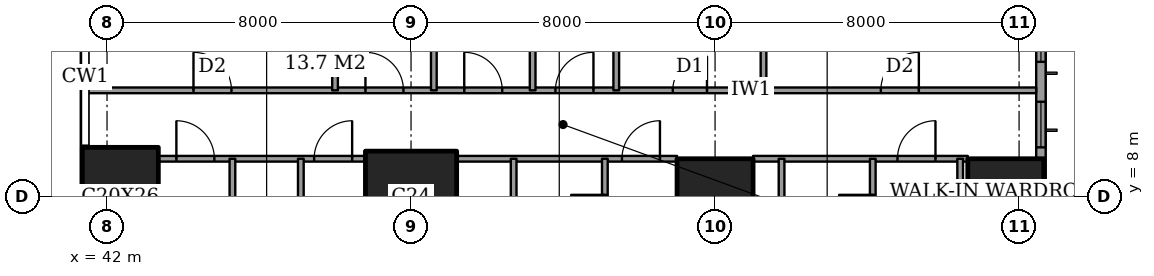
"""IFC4 building model, lengths in metres.
Left out: names, types, materials, properties, quantities, classifications, styles, units other than length and angle.
Written with IfcOpenShell. Run it as: python <this file> out.ifc"""

import sys

from ifc_helpers import new_model, si_unit, direction, frame, frame_2d, origin, origin_2d, place, context, subcontext, project, spatial, rectangle, extrude, element, fill, save


model = new_model("IFC4")
c1 = context("Model", 3, precision=1e-05, world=origin(), true_north=direction((0.0, 1.0)))
c2 = subcontext(c1, "Body", "Model", "MODEL_VIEW")
j1 = project(units=[si_unit("LENGTHUNIT", "METRE"), si_unit("PLANEANGLEUNIT", "RADIAN")], contexts=[c1])
p1 = place(None, origin())
s1 = spatial("IfcSite", under=j1, at=p1, CompositionType="ELEMENT")
p2 = place(p1, origin())
s2 = spatial("IfcBuilding", under=s1, at=p2, CompositionType="ELEMENT")
p3 = place(p2, frame((0.0, 0.0, 128.6)))
s3 = spatial("IfcBuildingStorey", under=s2, at=p3, CompositionType="ELEMENT", Elevation=128.6)
p4 = place(p3, frame((42.35, 8.0, 0.0), z_axis=(0.0, 0.0, 1.0), x_axis=(1.0, 0.0, 0.0)))
e1 = element("IfcColumn", 1, at=p4, inside=s3, PredefinedType="COLUMN", context=c2, shape_type="SweptSolid", body=[
    extrude(rectangle(XDim=2.0, YDim=2.6, at=origin_2d()), origin(), (0.0, 0.0, 1.0), 3.6),
])
p5 = place(p3, frame((50.0, 8.0, 0.0), z_axis=(0.0, 0.0, 1.0), x_axis=(1.0, 0.0, 0.0)))
e2 = element("IfcColumn", 2, at=p5, inside=s3, PredefinedType="COLUMN", context=c2, shape_type="SweptSolid", body=[
    extrude(rectangle(XDim=2.4, YDim=2.4, at=origin_2d()), origin(), (0.0, 0.0, 1.0), 3.6),
])
for number, where, z_axis, x_axis in (
    (3, (58.0, 8.0, 0.0), (0.0, 0.0, 1.0), (1.0, 0.0, 0.0)),
    (4, (65.65, 8.0, 0.0), (0.0, 0.0, 1.0), (1.0, 0.0, 0.0)),
):
    element("IfcColumn", number, at=place(p3, frame(where, z_axis=z_axis, x_axis=x_axis)), inside=s3, PredefinedType="COLUMN", context=c2, shape_type="SweptSolid", body=[
        extrude(rectangle(XDim=2.0, YDim=2.0, at=origin_2d()), origin(), (0.0, 0.0, 1.0), 3.6),
    ])
p6 = place(p3, frame((66.575, 3.175, 0.0), z_axis=(0.0, 0.0, 1.0), x_axis=(0.0, 1.0, 0.0)))
e5 = element("IfcWall", 5, at=p6, inside=s3, PredefinedType="SOLIDWALL", context=c2, shape_type="SweptSolid", body=[
    extrude(rectangle(XDim=41.65, YDim=0.25, at=frame_2d((20.825, 0.0))), origin(), (0.0, 0.0, 1.0), 3.6),
])
p7 = place(p6, frame((0.775, 0.0, 0.4)))
e6 = element("IfcOpeningElement", 6, at=p7, cuts=e5, PredefinedType="OPENING", context=c2, shape_type="SweptSolid", body=[
    extrude(rectangle(XDim=2.4, YDim=2.2, at=frame_2d((1.2, 1.1))), frame((0.0, 0.135, 0.0), z_axis=(0.0, -1.0, 0.0), x_axis=(1.0, 0.0, 0.0)), (0.0, 0.0, 1.0), 0.27),
])
p8 = place(p6, frame((6.125, 0.0, 0.4)))
e7 = element("IfcOpeningElement", 7, at=p8, cuts=e5, PredefinedType="OPENING", context=c2, shape_type="SweptSolid", body=[
    extrude(rectangle(XDim=1.2, YDim=2.2, at=frame_2d((0.6, 1.1))), frame((0.0, 0.135, 0.0), z_axis=(0.0, -1.0, 0.0), x_axis=(1.0, 0.0, 0.0)), (0.0, 0.0, 1.0), 0.27),
])
p9 = place(p6, frame((8.375, 0.0, 0.4)))
e8 = element("IfcOpeningElement", 8, at=p9, cuts=e5, PredefinedType="OPENING", context=c2, shape_type="SweptSolid", body=[
    extrude(rectangle(XDim=2.4, YDim=2.2, at=frame_2d((1.2, 1.1))), frame((0.0, 0.135, 0.0), z_axis=(0.0, -1.0, 0.0), x_axis=(1.0, 0.0, 0.0)), (0.0, 0.0, 1.0), 0.27),
])
p10 = place(p6, frame((15.775, 0.0, 0.4)))
e9 = element("IfcOpeningElement", 9, at=p10, cuts=e5, PredefinedType="OPENING", context=c2, shape_type="SweptSolid", body=[
    extrude(rectangle(XDim=2.4, YDim=2.2, at=frame_2d((1.2, 1.1))), frame((0.0, 0.135, 0.0), z_axis=(0.0, -1.0, 0.0), x_axis=(1.0, 0.0, 0.0)), (0.0, 0.0, 1.0), 0.27),
])
p11 = place(p6, frame((23.475, 0.0, 0.4)))
e10 = element("IfcOpeningElement", 10, at=p11, cuts=e5, PredefinedType="OPENING", context=c2, shape_type="SweptSolid", body=[
    extrude(rectangle(XDim=2.4, YDim=2.2, at=frame_2d((1.2, 1.1))), frame((0.0, 0.135, 0.0), z_axis=(0.0, -1.0, 0.0), x_axis=(1.0, 0.0, 0.0)), (0.0, 0.0, 1.0), 0.27),
])
p12 = place(p6, frame((30.975, 0.0, 0.4)))
e11 = element("IfcOpeningElement", 11, at=p12, cuts=e5, PredefinedType="OPENING", context=c2, shape_type="SweptSolid", body=[
    extrude(rectangle(XDim=2.4, YDim=2.2, at=frame_2d((1.2, 1.1))), frame((0.0, 0.135, 0.0), z_axis=(0.0, -1.0, 0.0), x_axis=(1.0, 0.0, 0.0)), (0.0, 0.0, 1.0), 0.27),
])
p13 = place(p6, frame((34.5, 0.0, 0.4)))
e12 = element("IfcOpeningElement", 12, at=p13, cuts=e5, PredefinedType="OPENING", context=c2, shape_type="SweptSolid", body=[
    extrude(rectangle(XDim=1.2, YDim=2.2, at=frame_2d((0.6, 1.1))), frame((0.0, 0.135, 0.0), z_axis=(0.0, -1.0, 0.0), x_axis=(1.0, 0.0, 0.0)), (0.0, 0.0, 1.0), 0.27),
])
p14 = place(p6, frame((38.475, 0.0, 0.4)))
e13 = element("IfcOpeningElement", 13, at=p14, cuts=e5, PredefinedType="OPENING", context=c2, shape_type="SweptSolid", body=[
    extrude(rectangle(XDim=2.4, YDim=2.2, at=frame_2d((1.2, 1.1))), frame((0.0, 0.135, 0.0), z_axis=(0.0, -1.0, 0.0), x_axis=(1.0, 0.0, 0.0)), (0.0, 0.0, 1.0), 0.27),
])
p15 = place(p3, frame((43.35, 9.0, 0.0), z_axis=(0.0, 0.0, 1.0), x_axis=(1.0, 0.0, 0.0)))
e14 = element("IfcWall", 14, at=p15, inside=s3, PredefinedType="PARTITIONING", context=c2, shape_type="SweptSolid", body=[
    extrude(rectangle(XDim=5.45, YDim=0.15, at=frame_2d((2.725, 0.0))), origin(), (0.0, 0.0, 1.0), 3.35),
])
p16 = place(p15, frame((4.1, 0.0, 0.0)))
e15 = element("IfcOpeningElement", 15, at=p16, cuts=e14, PredefinedType="OPENING", context=c2, shape_type="SweptSolid", body=[
    extrude(rectangle(XDim=1.0, YDim=2.1, at=frame_2d((0.5, 1.05))), frame((0.0, 0.085, 0.0), z_axis=(0.0, -1.0, 0.0), x_axis=(1.0, 0.0, 0.0)), (0.0, 0.0, 1.0), 0.17),
])
p17 = place(p15, frame((0.475, 0.0, 0.0)))
e16 = element("IfcOpeningElement", 16, at=p17, cuts=e14, PredefinedType="OPENING", context=c2, shape_type="SweptSolid", body=[
    extrude(rectangle(XDim=1.0, YDim=2.1, at=frame_2d((0.5, 1.05))), frame((0.0, 0.085, 0.0), z_axis=(0.0, -1.0, 0.0), x_axis=(1.0, 0.0, 0.0)), (0.0, 0.0, 1.0), 0.17),
])
p18 = place(p3, frame((51.2, 9.0, 0.0), z_axis=(0.0, 0.0, 1.0), x_axis=(1.0, 0.0, 0.0)))
e17 = element("IfcWall", 17, at=p18, inside=s3, PredefinedType="PARTITIONING", context=c2, shape_type="SweptSolid", body=[
    extrude(rectangle(XDim=5.8, YDim=0.15, at=frame_2d((2.9, 0.0))), origin(), (0.0, 0.0, 1.0), 3.35),
])
p19 = place(p18, frame((4.35, 0.0, 0.0)))
e18 = element("IfcOpeningElement", 18, at=p19, cuts=e17, PredefinedType="OPENING", context=c2, shape_type="SweptSolid", body=[
    extrude(rectangle(XDim=1.0, YDim=2.1, at=frame_2d((0.5, 1.05))), frame((0.0, 0.085, 0.0), z_axis=(0.0, -1.0, 0.0), x_axis=(1.0, 0.0, 0.0)), (0.0, 0.0, 1.0), 0.17),
])
p20 = place(p3, frame((59.0, 9.0, 0.0), z_axis=(0.0, 0.0, 1.0), x_axis=(1.0, 0.0, 0.0)))
e19 = element("IfcWall", 19, at=p20, inside=s3, PredefinedType="PARTITIONING", context=c2, shape_type="SweptSolid", body=[
    extrude(rectangle(XDim=5.65, YDim=0.15, at=frame_2d((2.825, 0.0))), origin(), (0.0, 0.0, 1.0), 3.35),
])
p21 = place(p20, frame((3.8, 0.0, 0.0)))
e20 = element("IfcOpeningElement", 20, at=p21, cuts=e19, PredefinedType="OPENING", context=c2, shape_type="SweptSolid", body=[
    extrude(rectangle(XDim=1.0, YDim=2.1, at=frame_2d((0.5, 1.05))), frame((0.0, 0.085, 0.0), z_axis=(0.0, -1.0, 0.0), x_axis=(1.0, 0.0, 0.0)), (0.0, 0.0, 1.0), 0.17),
])
p22 = place(p3, frame((41.439, 10.8, 0.0), z_axis=(0.0, 0.0, 1.0), x_axis=(1.0, 0.0, 0.0)))
e21 = element("IfcWall", 21, at=p22, inside=s3, PredefinedType="PARTITIONING", context=c2, shape_type="SweptSolid", body=[
    extrude(rectangle(XDim=25.011, YDim=0.15, at=frame_2d((12.505, 0.0))), origin(), (0.0, 0.0, 1.0), 3.35),
])
p23 = place(p22, frame((12.361, 0.0, 0.0)))
e22 = element("IfcOpeningElement", 22, at=p23, cuts=e21, PredefinedType="OPENING", context=c2, shape_type="SweptSolid", body=[
    extrude(rectangle(XDim=1.0, YDim=2.1, at=frame_2d((0.5, 1.05))), frame((0.0, 0.085, 0.0), z_axis=(0.0, -1.0, 0.0), x_axis=(1.0, 0.0, 0.0)), (0.0, 0.0, 1.0), 0.17),
])
p24 = place(p22, frame((20.924, 0.0, 0.0)))
e23 = element("IfcOpeningElement", 23, at=p24, cuts=e21, PredefinedType="OPENING", context=c2, shape_type="SweptSolid", body=[
    extrude(rectangle(XDim=1.0, YDim=2.1, at=frame_2d((0.5, 1.05))), frame((0.0, 0.085, 0.0), z_axis=(0.0, -1.0, 0.0), x_axis=(1.0, 0.0, 0.0)), (0.0, 0.0, 1.0), 0.17),
])
p25 = place(p22, frame((15.448, 0.0, 0.0)))
e24 = element("IfcOpeningElement", 24, at=p25, cuts=e21, PredefinedType="OPENING", context=c2, shape_type="SweptSolid", body=[
    extrude(rectangle(XDim=0.9, YDim=2.1, at=frame_2d((0.45, 1.05))), frame((0.0, 0.085, 0.0), z_axis=(0.0, -1.0, 0.0), x_axis=(1.0, 0.0, 0.0)), (0.0, 0.0, 1.0), 0.17),
])
p26 = place(p22, frame((9.961, 0.0, 0.0)))
e25 = element("IfcOpeningElement", 25, at=p26, cuts=e21, PredefinedType="OPENING", context=c2, shape_type="SweptSolid", body=[
    extrude(rectangle(XDim=1.0, YDim=2.1, at=frame_2d((0.5, 1.05))), frame((0.0, 0.085, 0.0), z_axis=(0.0, -1.0, 0.0), x_axis=(1.0, 0.0, 0.0)), (0.0, 0.0, 1.0), 0.17),
])
p27 = place(p22, frame((7.361, 0.0, 0.0)))
e26 = element("IfcOpeningElement", 26, at=p27, cuts=e21, PredefinedType="OPENING", context=c2, shape_type="SweptSolid", body=[
    extrude(rectangle(XDim=1.0, YDim=2.1, at=frame_2d((0.5, 1.05))), frame((0.0, 0.085, 0.0), z_axis=(0.0, -1.0, 0.0), x_axis=(1.0, 0.0, 0.0)), (0.0, 0.0, 1.0), 0.17),
])
p28 = place(p22, frame((2.836, 0.0, 0.0)))
e27 = element("IfcOpeningElement", 27, at=p28, cuts=e21, PredefinedType="OPENING", context=c2, shape_type="SweptSolid", body=[
    extrude(rectangle(XDim=1.0, YDim=2.1, at=frame_2d((0.5, 1.05))), frame((0.0, 0.085, 0.0), z_axis=(0.0, -1.0, 0.0), x_axis=(1.0, 0.0, 0.0)), (0.0, 0.0, 1.0), 0.17),
])
p29 = place(p3, frame((45.3, -0.45, 0.0), z_axis=(0.0, 0.0, 1.0), x_axis=(0.0, 1.0, 0.0)))
e28 = element("IfcWall", 28, at=p29, inside=s3, PredefinedType="PARTITIONING", context=c2, shape_type="SweptSolid", body=[
    extrude(rectangle(XDim=9.45, YDim=0.15, at=frame_2d((4.725, 0.0))), origin(), (0.0, 0.0, 1.0), 3.35),
])
p30 = place(p3, frame((47.1, 5.2, 0.0), z_axis=(0.0, 0.0, 1.0), x_axis=(0.0, 1.0, 0.0)))
e29 = element("IfcWall", 29, at=p30, inside=s3, PredefinedType="PARTITIONING", context=c2, shape_type="SweptSolid", body=[
    extrude(rectangle(XDim=3.8, YDim=0.15, at=frame_2d((1.9, 0.0))), origin(), (0.0, 0.0, 1.0), 3.35),
])
p31 = place(p30, frame((1.45, 0.0, 0.0)))
e30 = element("IfcOpeningElement", 30, at=p31, cuts=e29, PredefinedType="OPENING", context=c2, shape_type="SweptSolid", body=[
    extrude(rectangle(XDim=0.9, YDim=2.1, at=frame_2d((0.45, 1.05))), frame((0.0, 0.085, 0.0), z_axis=(0.0, -1.0, 0.0), x_axis=(1.0, 0.0, 0.0)), (0.0, 0.0, 1.0), 0.17),
])
p32 = place(p3, frame((48.0, 10.8, 0.0), z_axis=(0.0, 0.0, 1.0), x_axis=(0.0, 1.0, 0.0)))
e31 = element("IfcWall", 31, at=p32, inside=s3, PredefinedType="PARTITIONING", context=c2, shape_type="SweptSolid", body=[
    extrude(rectangle(XDim=6.7, YDim=0.15, at=frame_2d((3.35, 0.0))), origin(), (0.0, 0.0, 1.0), 3.35),
])
p33 = place(p3, frame((50.6, 10.8, 0.0), z_axis=(0.0, 0.0, 1.0), x_axis=(0.0, 1.0, 0.0)))
e32 = element("IfcWall", 32, at=p33, inside=s3, PredefinedType="PARTITIONING", context=c2, shape_type="SweptSolid", body=[
    extrude(rectangle(XDim=4.0, YDim=0.15, at=frame_2d((2.0, 0.0))), origin(), (0.0, 0.0, 1.0), 3.35),
])
p34 = place(p3, frame((52.7, -0.45, 0.0), z_axis=(0.0, 0.0, 1.0), x_axis=(0.0, 1.0, 0.0)))
e33 = element("IfcWall", 33, at=p34, inside=s3, PredefinedType="PARTITIONING", context=c2, shape_type="SweptSolid", body=[
    extrude(rectangle(XDim=9.45, YDim=0.15, at=frame_2d((4.725, 0.0))), origin(), (0.0, 0.0, 1.0), 3.35),
])
p35 = place(p34, frame((2.875, 0.0, 0.0)))
e34 = element("IfcOpeningElement", 34, at=p35, cuts=e33, PredefinedType="OPENING", context=c2, shape_type="SweptSolid", body=[
    extrude(rectangle(XDim=0.9, YDim=2.1, at=frame_2d((0.45, 1.05))), frame((0.0, 0.085, 0.0), z_axis=(0.0, -1.0, 0.0), x_axis=(1.0, 0.0, 0.0)), (0.0, 0.0, 1.0), 0.17),
])
p36 = place(p3, frame((53.2, 10.8, 0.0), z_axis=(0.0, 0.0, 1.0), x_axis=(0.0, 1.0, 0.0)))
e35 = element("IfcWall", 35, at=p36, inside=s3, PredefinedType="PARTITIONING", context=c2, shape_type="SweptSolid", body=[
    extrude(rectangle(XDim=6.7, YDim=0.15, at=frame_2d((3.35, 0.0))), origin(), (0.0, 0.0, 1.0), 3.35),
])
p37 = place(p3, frame((55.1, 6.2, 0.0), z_axis=(0.0, 0.0, 1.0), x_axis=(0.0, 1.0, 0.0)))
e36 = element("IfcWall", 36, at=p37, inside=s3, PredefinedType="PARTITIONING", context=c2, shape_type="SweptSolid", body=[
    extrude(rectangle(XDim=2.8, YDim=0.15, at=frame_2d((1.4, 0.0))), origin(), (0.0, 0.0, 1.0), 3.35),
])
p38 = place(p37, frame((0.95, 0.0, 0.0)))
e37 = element("IfcOpeningElement", 37, at=p38, cuts=e36, PredefinedType="OPENING", context=c2, shape_type="SweptSolid", body=[
    extrude(rectangle(XDim=0.9, YDim=2.1, at=frame_2d((0.45, 1.05))), frame((0.0, 0.085, 0.0), z_axis=(0.0, -1.0, 0.0), x_axis=(1.0, 0.0, 0.0)), (0.0, 0.0, 1.0), 0.17),
])
p39 = place(p3, frame((55.4, 10.8, 0.0), z_axis=(0.0, 0.0, 1.0), x_axis=(0.0, 1.0, 0.0)))
e38 = element("IfcWall", 38, at=p39, inside=s3, PredefinedType="PARTITIONING", context=c2, shape_type="SweptSolid", body=[
    extrude(rectangle(XDim=10.8, YDim=0.15, at=frame_2d((5.4, 0.0))), origin(), (0.0, 0.0, 1.0), 3.35),
])
p40 = place(p39, frame((8.25, 0.0, 0.0)))
e39 = element("IfcOpeningElement", 39, at=p40, cuts=e38, PredefinedType="OPENING", context=c2, shape_type="SweptSolid", body=[
    extrude(rectangle(XDim=1.0, YDim=2.1, at=frame_2d((0.5, 1.05))), frame((0.0, 0.085, 0.0), z_axis=(0.0, -1.0, 0.0), x_axis=(1.0, 0.0, 0.0)), (0.0, 0.0, 1.0), 0.17),
])
p41 = place(p3, frame((59.275, 10.8, 0.0), z_axis=(0.0, 0.0, 1.0), x_axis=(0.0, 1.0, 0.0)))
e40 = element("IfcWall", 40, at=p41, inside=s3, PredefinedType="PARTITIONING", context=c2, shape_type="SweptSolid", body=[
    extrude(rectangle(XDim=4.0, YDim=0.15, at=frame_2d((2.0, 0.0))), origin(), (0.0, 0.0, 1.0), 3.35),
])
p42 = place(p3, frame((59.75, -0.45, 0.0), z_axis=(0.0, 0.0, 1.0), x_axis=(0.0, 1.0, 0.0)))
e41 = element("IfcWall", 41, at=p42, inside=s3, PredefinedType="PARTITIONING", context=c2, shape_type="SweptSolid", body=[
    extrude(rectangle(XDim=9.45, YDim=0.15, at=frame_2d((4.725, 0.0))), origin(), (0.0, 0.0, 1.0), 3.35),
])
p43 = place(p42, frame((2.875, 0.0, 0.0)))
e42 = element("IfcOpeningElement", 42, at=p43, cuts=e41, PredefinedType="OPENING", context=c2, shape_type="SweptSolid", body=[
    extrude(rectangle(XDim=0.9, YDim=2.1, at=frame_2d((0.45, 1.05))), frame((0.0, 0.085, 0.0), z_axis=(0.0, -1.0, 0.0), x_axis=(1.0, 0.0, 0.0)), (0.0, 0.0, 1.0), 0.17),
])
p44 = place(p3, frame((62.15, 6.2, 0.0), z_axis=(0.0, 0.0, 1.0), x_axis=(0.0, 1.0, 0.0)))
e43 = element("IfcWall", 43, at=p44, inside=s3, PredefinedType="PARTITIONING", context=c2, shape_type="SweptSolid", body=[
    extrude(rectangle(XDim=2.8, YDim=0.15, at=frame_2d((1.4, 0.0))), origin(), (0.0, 0.0, 1.0), 3.35),
])
p45 = place(p44, frame((0.95, 0.0, 0.0)))
e44 = element("IfcOpeningElement", 44, at=p45, cuts=e43, PredefinedType="OPENING", context=c2, shape_type="SweptSolid", body=[
    extrude(rectangle(XDim=0.9, YDim=2.1, at=frame_2d((0.45, 1.05))), frame((0.0, 0.085, 0.0), z_axis=(0.0, -1.0, 0.0), x_axis=(1.0, 0.0, 0.0)), (0.0, 0.0, 1.0), 0.17),
])
p46 = place(p3, frame((64.45, 3.3, 0.0), z_axis=(0.0, 0.0, 1.0), x_axis=(0.0, 1.0, 0.0)))
e45 = element("IfcWall", 45, at=p46, inside=s3, PredefinedType="PARTITIONING", context=c2, shape_type="SweptSolid", body=[
    extrude(rectangle(XDim=5.7, YDim=0.15, at=frame_2d((2.85, 0.0))), origin(), (0.0, 0.0, 1.0), 3.35),
])
p47 = place(p46, frame((2.4, 0.0, 0.0)))
e46 = element("IfcOpeningElement", 46, at=p47, cuts=e45, PredefinedType="OPENING", context=c2, shape_type="SweptSolid", body=[
    extrude(rectangle(XDim=0.9, YDim=2.1, at=frame_2d((0.45, 1.05))), frame((0.0, 0.085, 0.0), z_axis=(0.0, -1.0, 0.0), x_axis=(1.0, 0.0, 0.0)), (0.0, 0.0, 1.0), 0.17),
])
p48 = place(p8, origin())
e47 = element("IfcWindow", 47, at=p48, inside=s3, PartitioningType="SINGLE_PANEL", PredefinedType="WINDOW", context=c2, shape_type="SweptSolid", body=[
    extrude(rectangle(XDim=1.2, YDim=2.2, at=frame_2d((0.6, 1.1))), frame((0.0, 0.03, 0.0), z_axis=(0.0, -1.0, 0.0), x_axis=(1.0, 0.0, 0.0)), (0.0, 0.0, 1.0), 0.06),
])
fill(e7, e47)
p49 = place(p9, origin())
e48 = element("IfcWindow", 48, at=p49, inside=s3, PartitioningType="SINGLE_PANEL", PredefinedType="WINDOW", context=c2, shape_type="SweptSolid", body=[
    extrude(rectangle(XDim=2.4, YDim=2.2, at=frame_2d((1.2, 1.1))), frame((0.0, 0.03, 0.0), z_axis=(0.0, -1.0, 0.0), x_axis=(1.0, 0.0, 0.0)), (0.0, 0.0, 1.0), 0.06),
])
fill(e8, e48)
p50 = place(p45, origin())
e49 = element("IfcDoor", 49, at=p50, inside=s3, OperationType="SINGLE_SWING_LEFT", PredefinedType="DOOR", context=c2, shape_type="SweptSolid", body=[
    extrude(rectangle(XDim=0.9, YDim=2.1, at=frame_2d((0.45, 1.05))), frame((0.0, 0.025, 0.0), z_axis=(0.0, -1.0, 0.0), x_axis=(1.0, 0.0, 0.0)), (0.0, 0.0, 1.0), 0.05),
])
fill(e44, e49)
p51 = place(p21, origin())
e50 = element("IfcDoor", 50, at=p51, inside=s3, OperationType="SINGLE_SWING_LEFT", PredefinedType="DOOR", context=c2, shape_type="SweptSolid", body=[
    extrude(rectangle(XDim=1.0, YDim=2.1, at=frame_2d((0.5, 1.05))), frame((0.0, 0.025, 0.0), z_axis=(0.0, -1.0, 0.0), x_axis=(1.0, 0.0, 0.0)), (0.0, 0.0, 1.0), 0.05),
])
fill(e20, e50)
p52 = place(p38, origin())
e51 = element("IfcDoor", 51, at=p52, inside=s3, OperationType="SINGLE_SWING_LEFT", PredefinedType="DOOR", context=c2, shape_type="SweptSolid", body=[
    extrude(rectangle(XDim=0.9, YDim=2.1, at=frame_2d((0.45, 1.05))), frame((0.0, 0.025, 0.0), z_axis=(0.0, -1.0, 0.0), x_axis=(1.0, 0.0, 0.0)), (0.0, 0.0, 1.0), 0.05),
])
fill(e37, e51)
p53 = place(p19, origin())
e52 = element("IfcDoor", 52, at=p53, inside=s3, OperationType="SINGLE_SWING_LEFT", PredefinedType="DOOR", context=c2, shape_type="SweptSolid", body=[
    extrude(rectangle(XDim=1.0, YDim=2.1, at=frame_2d((0.5, 1.05))), frame((0.0, 0.025, 0.0), z_axis=(0.0, -1.0, 0.0), x_axis=(1.0, 0.0, 0.0)), (0.0, 0.0, 1.0), 0.05),
])
fill(e18, e52)
p54 = place(p16, origin())
e53 = element("IfcDoor", 53, at=p54, inside=s3, OperationType="SINGLE_SWING_LEFT", PredefinedType="DOOR", context=c2, shape_type="SweptSolid", body=[
    extrude(rectangle(XDim=1.0, YDim=2.1, at=frame_2d((0.5, 1.05))), frame((0.0, 0.025, 0.0), z_axis=(0.0, -1.0, 0.0), x_axis=(1.0, 0.0, 0.0)), (0.0, 0.0, 1.0), 0.05),
])
fill(e15, e53)
p55 = place(p17, origin())
e54 = element("IfcDoor", 54, at=p55, inside=s3, OperationType="SINGLE_SWING_RIGHT", PredefinedType="DOOR", context=c2, shape_type="SweptSolid", body=[
    extrude(rectangle(XDim=1.0, YDim=2.1, at=frame_2d((0.5, 1.05))), frame((0.0, 0.025, 0.0), z_axis=(0.0, -1.0, 0.0), x_axis=(1.0, 0.0, 0.0)), (0.0, 0.0, 1.0), 0.05),
])
fill(e16, e54)
p56 = place(p23, origin())
e55 = element("IfcDoor", 55, at=p56, inside=s3, OperationType="SINGLE_SWING_LEFT", PredefinedType="DOOR", context=c2, shape_type="SweptSolid", body=[
    extrude(rectangle(XDim=1.0, YDim=2.1, at=frame_2d((0.5, 1.05))), frame((0.0, 0.025, 0.0), z_axis=(0.0, -1.0, 0.0), x_axis=(1.0, 0.0, 0.0)), (0.0, 0.0, 1.0), 0.05),
])
fill(e22, e55)
p57 = place(p24, origin())
e56 = element("IfcDoor", 56, at=p57, inside=s3, OperationType="SINGLE_SWING_LEFT", PredefinedType="DOOR", context=c2, shape_type="SweptSolid", body=[
    extrude(rectangle(XDim=1.0, YDim=2.1, at=frame_2d((0.5, 1.05))), frame((0.0, 0.025, 0.0), z_axis=(0.0, -1.0, 0.0), x_axis=(1.0, 0.0, 0.0)), (0.0, 0.0, 1.0), 0.05),
])
fill(e23, e56)
p58 = place(p25, origin())
e57 = element("IfcDoor", 57, at=p58, inside=s3, OperationType="SINGLE_SWING_LEFT", PredefinedType="DOOR", context=c2, shape_type="SweptSolid", body=[
    extrude(rectangle(XDim=0.9, YDim=2.1, at=frame_2d((0.45, 1.05))), frame((0.0, 0.025, 0.0), z_axis=(0.0, -1.0, 0.0), x_axis=(1.0, 0.0, 0.0)), (0.0, 0.0, 1.0), 0.05),
])
fill(e24, e57)
p59 = place(p26, origin())
e58 = element("IfcDoor", 58, at=p59, inside=s3, OperationType="SINGLE_SWING_RIGHT", PredefinedType="DOOR", context=c2, shape_type="SweptSolid", body=[
    extrude(rectangle(XDim=1.0, YDim=2.1, at=frame_2d((0.5, 1.05))), frame((0.0, 0.025, 0.0), z_axis=(0.0, -1.0, 0.0), x_axis=(1.0, 0.0, 0.0)), (0.0, 0.0, 1.0), 0.05),
])
fill(e25, e58)
p60 = place(p27, origin())
e59 = element("IfcDoor", 59, at=p60, inside=s3, OperationType="SINGLE_SWING_RIGHT", PredefinedType="DOOR", context=c2, shape_type="SweptSolid", body=[
    extrude(rectangle(XDim=1.0, YDim=2.1, at=frame_2d((0.5, 1.05))), frame((0.0, 0.025, 0.0), z_axis=(0.0, -1.0, 0.0), x_axis=(1.0, 0.0, 0.0)), (0.0, 0.0, 1.0), 0.05),
])
fill(e26, e59)
p61 = place(p28, origin())
e60 = element("IfcDoor", 60, at=p61, inside=s3, OperationType="SINGLE_SWING_RIGHT", PredefinedType="DOOR", context=c2, shape_type="SweptSolid", body=[
    extrude(rectangle(XDim=1.0, YDim=2.1, at=frame_2d((0.5, 1.05))), frame((0.0, 0.025, 0.0), z_axis=(0.0, -1.0, 0.0), x_axis=(1.0, 0.0, 0.0)), (0.0, 0.0, 1.0), 0.05),
])
fill(e27, e60)
save(model, sys.argv[1])
